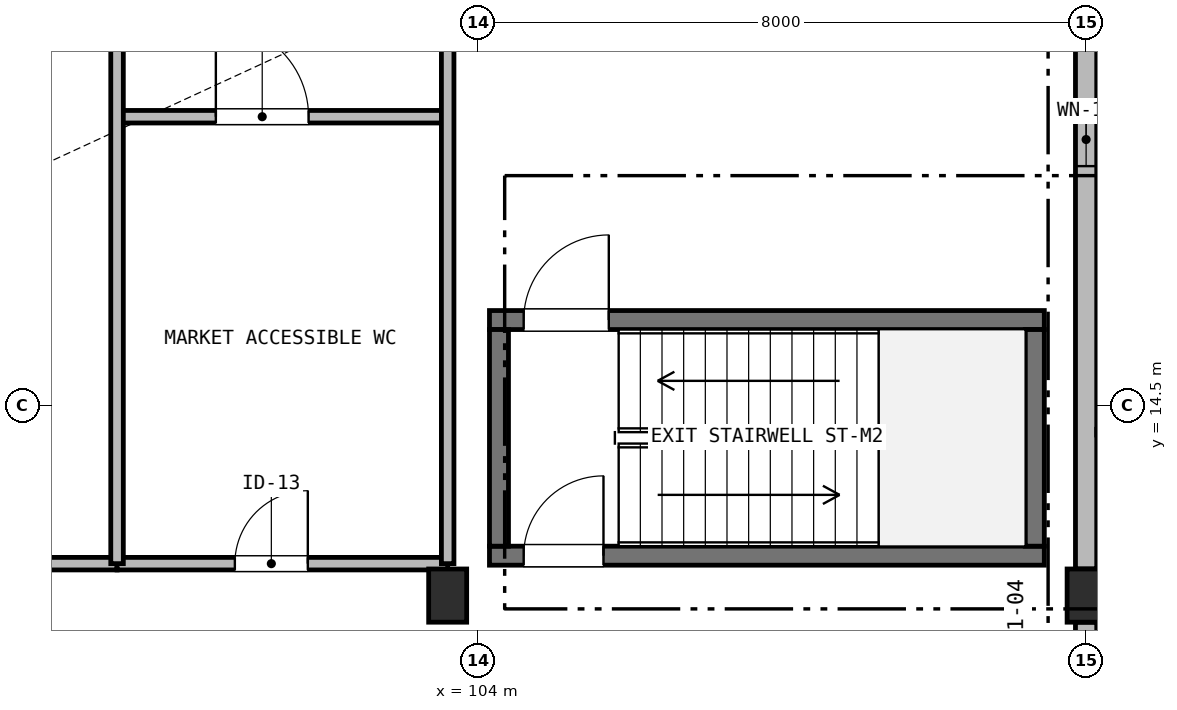
"""IFC4 building model, lengths in metres.
Left out: names, types, materials, properties, quantities, classifications, styles, units other than length and angle.
Written with IfcOpenShell. Run it as: python <this file> out.ifc"""

import sys

from ifc_helpers import new_model, si_unit, direction, frame, frame_2d, origin, origin_2d, place, context, subcontext, project, spatial, rectangle, extrude, element, fill, save


model = new_model("IFC4")
c1 = context("Model", 3, precision=1e-05, world=origin(), true_north=direction((0.0, 1.0)))
c2 = subcontext(c1, "Body", "Model", "MODEL_VIEW")
j1 = project(units=[si_unit("LENGTHUNIT", "METRE"), si_unit("PLANEANGLEUNIT", "RADIAN")], contexts=[c1])
p1 = place(None, origin())
s1 = spatial("IfcSite", under=j1, at=p1, CompositionType="ELEMENT")
p2 = place(p1, origin())
s2 = spatial("IfcBuilding", under=s1, at=p2, CompositionType="ELEMENT")
p3 = place(p2, origin())
s3 = spatial("IfcBuildingStorey", under=s2, at=p3, CompositionType="ELEMENT", Elevation=0.0)
p4 = place(p3, frame((104.15, 12.525, 0.0), z_axis=(0.0, 0.0, 1.0), x_axis=(1.0, 0.0, 0.0)))
e1 = element("IfcWall", 1, at=p4, inside=s3, PredefinedType="SHEAR", context=c2, shape_type="SweptSolid", body=[
    extrude(rectangle(XDim=7.3, YDim=0.25, at=frame_2d((3.65, 0.0))), origin(), (0.0, 0.0, 1.0), 4.5),
])
p5 = place(p4, frame((0.45, 0.0, 0.0)))
e2 = element("IfcOpeningElement", 2, at=p5, cuts=e1, PredefinedType="OPENING", context=c2, shape_type="SweptSolid", body=[
    extrude(rectangle(XDim=1.05, YDim=2.15, at=frame_2d((0.525, 1.075))), frame((0.0, 0.14, 0.0), z_axis=(0.0, -1.0, 0.0), x_axis=(1.0, 0.0, 0.0)), (0.0, 0.0, 1.0), 0.28),
])
p6 = place(p3, frame((104.15, 15.625, 0.0), z_axis=(0.0, 0.0, 1.0), x_axis=(1.0, 0.0, 0.0)))
e3 = element("IfcWall", 3, at=p6, inside=s3, PredefinedType="SHEAR", context=c2, shape_type="SweptSolid", body=[
    extrude(rectangle(XDim=7.3, YDim=0.25, at=frame_2d((3.65, 0.0))), origin(), (0.0, 0.0, 1.0), 4.5),
])
p7 = place(p6, frame((0.45, 0.0, 0.0)))
e4 = element("IfcOpeningElement", 4, at=p7, cuts=e3, PredefinedType="OPENING", context=c2, shape_type="SweptSolid", body=[
    extrude(rectangle(XDim=1.12, YDim=2.15, at=frame_2d((0.56, 1.075))), frame((0.0, 0.14, 0.0), z_axis=(0.0, -1.0, 0.0), x_axis=(1.0, 0.0, 0.0)), (0.0, 0.0, 1.0), 0.28),
])
for number, where, z_axis, x_axis in (
    (5, (104.275, 12.65, 0.0), (0.0, 0.0, 1.0), (0.0, 1.0, 0.0)),
    (6, (111.325, 12.65, 0.0), (0.0, 0.0, 1.0), (0.0, 1.0, 0.0)),
):
    element("IfcWall", number, at=place(p3, frame(where, z_axis=z_axis, x_axis=x_axis)), inside=s3, PredefinedType="SHEAR", context=c2, shape_type="SweptSolid", body=[
        extrude(rectangle(XDim=2.85, YDim=0.25, at=frame_2d((1.425, 0.0))), origin(), (0.0, 0.0, 1.0), 4.5),
    ])
for number, where, z_axis, x_axis in (
    (7, (103.6, 12.0, 0.0), (0.0, 0.0, 1.0), (1.0, 0.0, 0.0)),
    (8, (112.0, 12.0, 0.0), (0.0, 0.0, 1.0), (1.0, 0.0, 0.0)),
):
    element("IfcColumn", number, at=place(p3, frame(where, z_axis=z_axis, x_axis=x_axis)), inside=s3, PredefinedType="COLUMN", context=c2, shape_type="SweptSolid", body=[
        extrude(rectangle(XDim=0.5, YDim=0.7, at=origin_2d()), origin(), (0.0, 0.0, 1.0), 4.5),
    ])
p8 = place(p3, frame((112.0, 11.65, 0.0), z_axis=(0.0, 0.0, 1.0), x_axis=(0.0, -1.0, 0.0)))
e9 = element("IfcWall", 9, at=p8, inside=s3, PredefinedType="SOLIDWALL", context=c2, shape_type="SweptSolid", body=[
    extrude(rectangle(XDim=11.3, YDim=0.28, at=frame_2d((5.65, 0.0))), origin(), (0.0, 0.0, 1.0), 3.59),
])
p9 = place(p8, frame((5.3, 0.0, 0.42)))
e10 = element("IfcOpeningElement", 10, at=p9, cuts=e9, PredefinedType="OPENING", context=c2, shape_type="SweptSolid", body=[
    extrude(rectangle(XDim=0.7, YDim=2.14, at=frame_2d((0.35, 1.07))), frame((0.0, 0.155, 0.0), z_axis=(0.0, -1.0, 0.0), x_axis=(1.0, 0.0, 0.0)), (0.0, 0.0, 1.0), 0.31),
])
p10 = place(p3, frame((112.0, 23.65, 0.0), z_axis=(0.0, 0.0, 1.0), x_axis=(0.0, -1.0, 0.0)))
e11 = element("IfcWall", 11, at=p10, inside=s3, PredefinedType="SOLIDWALL", context=c2, shape_type="SweptSolid", body=[
    extrude(rectangle(XDim=11.3, YDim=0.28, at=frame_2d((5.65, 0.0))), origin(), (0.0, 0.0, 1.0), 3.59),
])
p11 = place(p10, frame((5.3, 0.0, 0.42)))
e12 = element("IfcOpeningElement", 12, at=p11, cuts=e11, PredefinedType="OPENING", context=c2, shape_type="SweptSolid", body=[
    extrude(rectangle(XDim=0.7, YDim=2.14, at=frame_2d((0.35, 1.07))), frame((0.0, 0.155, 0.0), z_axis=(0.0, -1.0, 0.0), x_axis=(1.0, 0.0, 0.0)), (0.0, 0.0, 1.0), 0.31),
])
p12 = place(p3, frame((94.2, 12.42, 0.0), z_axis=(0.0, 0.0, 1.0), x_axis=(1.0, 0.0, 0.0)))
e13 = element("IfcWall", 13, at=p12, inside=s3, PredefinedType="PLUMBINGWALL", context=c2, shape_type="SweptSolid", body=[
    extrude(rectangle(XDim=5.05, YDim=0.165, at=frame_2d((2.525, 0.0))), origin(), (0.0, 0.0, 1.0), 4.23),
])
p13 = place(p12, frame((2.15, 0.0, 0.0)))
e14 = element("IfcOpeningElement", 14, at=p13, cuts=e13, PredefinedType="OPENING", context=c2, shape_type="SweptSolid", body=[
    extrude(rectangle(XDim=0.86, YDim=2.1, at=frame_2d((0.43, 1.05))), frame((0.0, 0.097, 0.0), z_axis=(0.0, -1.0, 0.0), x_axis=(1.0, 0.0, 0.0)), (0.0, 0.0, 1.0), 0.195),
])
p14 = place(p3, frame((99.25, 12.42, 0.0), z_axis=(0.0, 0.0, 1.0), x_axis=(1.0, 0.0, 0.0)))
e15 = element("IfcWall", 15, at=p14, inside=s3, PredefinedType="PLUMBINGWALL", context=c2, shape_type="SweptSolid", body=[
    extrude(rectangle(XDim=4.35, YDim=0.165, at=frame_2d((2.175, 0.0))), origin(), (0.0, 0.0, 1.0), 4.23),
])
p15 = place(p14, frame((1.55, 0.0, 0.0)))
e16 = element("IfcOpeningElement", 16, at=p15, cuts=e15, PredefinedType="OPENING", context=c2, shape_type="SweptSolid", body=[
    extrude(rectangle(XDim=0.96, YDim=2.12, at=frame_2d((0.48, 1.06))), frame((0.0, 0.097, 0.0), z_axis=(0.0, -1.0, 0.0), x_axis=(1.0, 0.0, 0.0)), (0.0, 0.0, 1.0), 0.195),
])
p16 = place(p3, frame((99.25, 18.3, 0.0), z_axis=(0.0, 0.0, 1.0), x_axis=(1.0, 0.0, 0.0)))
e17 = element("IfcWall", 17, at=p16, inside=s3, PredefinedType="PLUMBINGWALL", context=c2, shape_type="SweptSolid", body=[
    extrude(rectangle(XDim=4.35, YDim=0.165, at=frame_2d((2.175, 0.0))), origin(), (0.0, 0.0, 1.0), 4.23),
])
p17 = place(p16, frame((1.3, 0.0, 0.0)))
e18 = element("IfcOpeningElement", 18, at=p17, cuts=e17, PredefinedType="OPENING", context=c2, shape_type="SweptSolid", body=[
    extrude(rectangle(XDim=1.22, YDim=2.15, at=frame_2d((0.61, 1.075))), frame((0.0, 0.097, 0.0), z_axis=(0.0, -1.0, 0.0), x_axis=(1.0, 0.0, 0.0)), (0.0, 0.0, 1.0), 0.195),
])
p18 = place(p3, frame((99.25, 12.42, 0.0), z_axis=(0.0, 0.0, 1.0), x_axis=(0.0, 1.0, 0.0)))
e19 = element("IfcWall", 19, at=p18, inside=s3, PredefinedType="PLUMBINGWALL", context=c2, shape_type="SweptSolid", body=[
    extrude(rectangle(XDim=11.54, YDim=0.165, at=frame_2d((5.77, 0.0))), origin(), (0.0, 0.0, 1.0), 4.23),
])
p19 = place(p3, frame((103.6, 12.42, 0.0), z_axis=(0.0, 0.0, 1.0), x_axis=(0.0, 1.0, 0.0)))
e20 = element("IfcWall", 20, at=p19, inside=s3, PredefinedType="PLUMBINGWALL", context=c2, shape_type="SweptSolid", body=[
    extrude(rectangle(XDim=11.54, YDim=0.165, at=frame_2d((5.77, 0.0))), origin(), (0.0, 0.0, 1.0), 3.6),
])
p20 = place(p11, origin())
e21 = element("IfcWindow", 21, at=p20, inside=s3, PartitioningType="SINGLE_PANEL", PredefinedType="WINDOW", context=c2, shape_type="SweptSolid", body=[
    extrude(rectangle(XDim=0.7, YDim=2.14, at=frame_2d((0.35, 1.07))), frame((0.0, 0.03, 0.0), z_axis=(0.0, -1.0, 0.0), x_axis=(1.0, 0.0, 0.0)), (0.0, 0.0, 1.0), 0.06),
])
fill(e12, e21)
p21 = place(p15, origin())
e22 = element("IfcDoor", 22, at=p21, inside=s3, OperationType="SINGLE_SWING_RIGHT", PredefinedType="DOOR", context=c2, shape_type="SweptSolid", body=[
    extrude(rectangle(XDim=0.96, YDim=2.12, at=frame_2d((0.48, 1.06))), frame((0.0, 0.025, 0.0), z_axis=(0.0, -1.0, 0.0), x_axis=(1.0, 0.0, 0.0)), (0.0, 0.0, 1.0), 0.05),
])
fill(e16, e22)
p22 = place(p17, origin())
e23 = element("IfcDoor", 23, at=p22, inside=s3, OperationType="SINGLE_SWING_LEFT", PredefinedType="DOOR", context=c2, shape_type="SweptSolid", body=[
    extrude(rectangle(XDim=1.22, YDim=2.15, at=frame_2d((0.61, 1.075))), frame((0.0, 0.025, 0.0), z_axis=(0.0, -1.0, 0.0), x_axis=(1.0, 0.0, 0.0)), (0.0, 0.0, 1.0), 0.05),
])
fill(e18, e23)
p23 = place(p5, origin())
e24 = element("IfcDoor", 24, at=p23, inside=s3, OperationType="SINGLE_SWING_RIGHT", PredefinedType="DOOR", context=c2, shape_type="SweptSolid", body=[
    extrude(rectangle(XDim=1.05, YDim=2.15, at=frame_2d((0.525, 1.075))), frame((0.0, 0.025, 0.0), z_axis=(0.0, -1.0, 0.0), x_axis=(1.0, 0.0, 0.0)), (0.0, 0.0, 1.0), 0.05),
])
fill(e2, e24)
p24 = place(p7, origin())
e25 = element("IfcDoor", 25, at=p24, inside=s3, OperationType="SINGLE_SWING_RIGHT", PredefinedType="DOOR", context=c2, shape_type="SweptSolid", body=[
    extrude(rectangle(XDim=1.12, YDim=2.15, at=frame_2d((0.56, 1.075))), frame((0.0, 0.025, 0.0), z_axis=(0.0, -1.0, 0.0), x_axis=(1.0, 0.0, 0.0)), (0.0, 0.0, 1.0), 0.05),
])
fill(e4, e25)
save(model, sys.argv[1])
